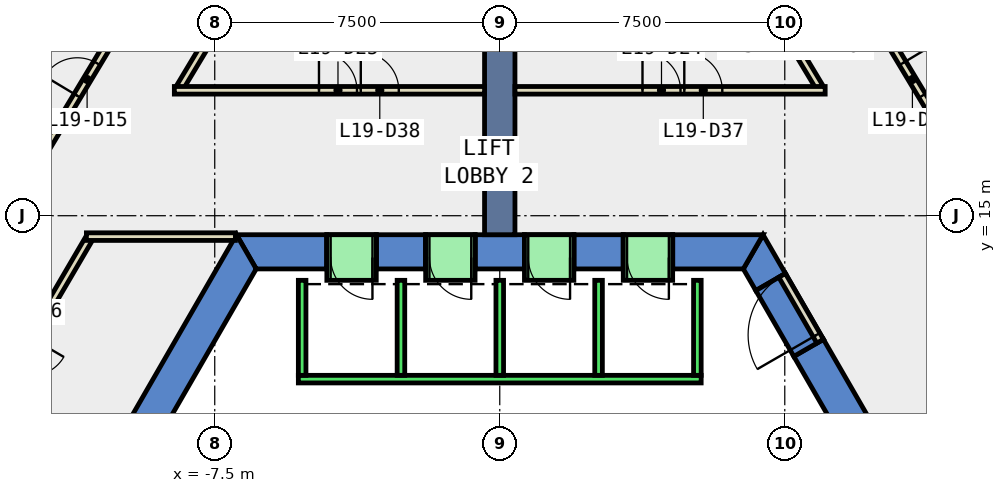
"""IFC4 building model, lengths in metres.
Left out: names, types, materials, properties, quantities, classifications, styles, units other than length and angle.
Written with IfcOpenShell. Run it as: python <this file> out.ifc"""

import sys

from ifc_helpers import new_model, si_unit, direction, frame, frame_2d, origin, place, context, subcontext, project, spatial, polyline, rectangle, outline, extrude, element, fill, save


model = new_model("IFC4")
c1 = context("Model", 3, precision=1e-05, world=origin(), true_north=direction((0.0, 1.0)))
c2 = subcontext(c1, "Body", "Model", "MODEL_VIEW")
j1 = project(units=[si_unit("LENGTHUNIT", "METRE"), si_unit("PLANEANGLEUNIT", "RADIAN")], contexts=[c1])
p1 = place(None, origin())
s1 = spatial("IfcSite", under=j1, at=p1, CompositionType="ELEMENT")
p2 = place(p1, origin())
s2 = spatial("IfcBuilding", under=s1, at=p2, CompositionType="ELEMENT")
p3 = place(p2, frame((0.0, 0.0, 90.8)))
s3 = spatial("IfcBuildingStorey", under=s2, at=p3, CompositionType="ELEMENT", Elevation=90.8)
p4 = place(p3, frame((0.0, 0.0, -0.4)))
e1 = element("IfcWall", 1, at=p4, inside=s3, PredefinedType="SHEAR", context=c2, shape_type="SweptSolid", body=[
    extrude(outline(polyline([(8.517, 11.748), (7.738, 11.298), (12.817, 2.5), (13.856, 2.5), (8.517, 11.748)])), origin(), (0.0, 0.0, 1.0), 4.2),
])
p5 = place(p3, frame((0.0, 0.0, -0.4)))
e2 = element("IfcWall", 2, at=p5, inside=s3, PredefinedType="SHEAR", context=c2, shape_type="SweptSolid", body=[
    extrude(outline(polyline([(6.738, 13.03), (7.517, 13.48), (6.928, 14.5), (6.409, 13.6), (6.738, 13.03)])), origin(), (0.0, 0.0, 1.0), 4.2),
])
p6 = place(p3, frame((0.0, 0.0, 3.6)))
e3 = element("IfcWall", 3, at=p6, inside=s3, PredefinedType="SHEAR", context=c2, shape_type="SweptSolid", body=[
    extrude(outline(polyline([(7.517, 13.48), (6.738, 13.03), (7.738, 11.298), (8.517, 11.748), (7.517, 13.48)])), origin(), (0.0, 0.0, 1.0), 0.2),
])
p7 = place(p3, frame((0.0, 0.0, -0.4)))
e4 = element("IfcWall", 4, at=p7, inside=s3, PredefinedType="SHEAR", context=c2, shape_type="SweptSolid", body=[
    extrude(outline(polyline([(4.55, 14.5), (4.55, 13.6), (6.409, 13.6), (6.928, 14.5), (4.55, 14.5)])), origin(), (0.0, 0.0, 1.0), 4.2),
])
p8 = place(p3, frame((0.0, 0.0, -0.4)))
e5 = element("IfcWall", 5, at=p8, inside=s3, PredefinedType="SHEAR", context=c2, shape_type="SweptSolid", body=[
    extrude(outline(polyline([(1.95, 14.5), (1.95, 13.6), (3.25, 13.6), (3.25, 14.5), (1.95, 14.5)])), origin(), (0.0, 0.0, 1.0), 4.2),
])
p9 = place(p3, frame((0.0, 0.0, -0.4)))
e6 = element("IfcWall", 6, at=p9, inside=s3, PredefinedType="SHEAR", context=c2, shape_type="SweptSolid", body=[
    extrude(outline(polyline([(-0.65, 14.5), (-0.65, 13.6), (0.65, 13.6), (0.65, 14.5), (-0.65, 14.5)])), origin(), (0.0, 0.0, 1.0), 4.2),
])
p10 = place(p3, frame((0.0, 0.0, -0.4)))
e7 = element("IfcWall", 7, at=p10, inside=s3, PredefinedType="SHEAR", context=c2, shape_type="SweptSolid", body=[
    extrude(outline(polyline([(-3.25, 14.5), (-3.25, 13.6), (-1.95, 13.6), (-1.95, 14.5), (-3.25, 14.5)])), origin(), (0.0, 0.0, 1.0), 4.2),
])
p11 = place(p3, frame((0.0, 0.0, -0.4)))
e8 = element("IfcWall", 8, at=p11, inside=s3, PredefinedType="SHEAR", context=c2, shape_type="SweptSolid", body=[
    extrude(outline(polyline([(-4.55, 13.6), (-4.55, 14.5), (-6.928, 14.5), (-6.409, 13.6), (-4.55, 13.6)])), origin(), (0.0, 0.0, 1.0), 4.2),
])
p12 = place(p3, frame((0.0, 0.0, 3.6)))
e9 = element("IfcWall", 9, at=p12, inside=s3, PredefinedType="SHEAR", context=c2, shape_type="SweptSolid", body=[
    extrude(outline(polyline([(3.25, 14.5), (3.25, 13.6), (4.55, 13.6), (4.55, 14.5), (3.25, 14.5)])), origin(), (0.0, 0.0, 1.0), 0.2),
])
p13 = place(p3, frame((0.0, 0.0, 3.6)))
e10 = element("IfcWall", 10, at=p13, inside=s3, PredefinedType="SHEAR", context=c2, shape_type="SweptSolid", body=[
    extrude(outline(polyline([(0.65, 14.5), (0.65, 13.6), (1.95, 13.6), (1.95, 14.5), (0.65, 14.5)])), origin(), (0.0, 0.0, 1.0), 0.2),
])
p14 = place(p3, frame((0.0, 0.0, 3.6)))
e11 = element("IfcWall", 11, at=p14, inside=s3, PredefinedType="SHEAR", context=c2, shape_type="SweptSolid", body=[
    extrude(outline(polyline([(-1.95, 14.5), (-1.95, 13.6), (-0.65, 13.6), (-0.65, 14.5), (-1.95, 14.5)])), origin(), (0.0, 0.0, 1.0), 0.2),
])
p15 = place(p3, frame((0.0, 0.0, 3.6)))
e12 = element("IfcWall", 12, at=p15, inside=s3, PredefinedType="SHEAR", context=c2, shape_type="SweptSolid", body=[
    extrude(outline(polyline([(-4.55, 14.5), (-4.55, 13.6), (-3.25, 13.6), (-3.25, 14.5), (-4.55, 14.5)])), origin(), (0.0, 0.0, 1.0), 0.2),
])
p16 = place(p3, frame((0.0, 0.0, -0.4)))
e13 = element("IfcWall", 13, at=p16, inside=s3, PredefinedType="SHEAR", context=c2, shape_type="SweptSolid", body=[
    extrude(outline(polyline([(-12.267, 5.252), (-11.488, 4.802), (-6.409, 13.6), (-6.928, 14.5), (-12.267, 5.252)])), origin(), (0.0, 0.0, 1.0), 4.2),
])
p17 = place(p3, frame((0.0, 14.5, -0.4), z_axis=(0.0, 0.0, 1.0), x_axis=(0.0, 1.0, 0.0)))
e14 = element("IfcWall", 14, at=p17, inside=s3, PredefinedType="SHEAR", context=c2, shape_type="SweptSolid", body=[
    extrude(rectangle(XDim=9.0, YDim=0.8, at=frame_2d((4.5, 0.0))), origin(), (0.0, 0.0, 1.0), 4.2),
])
for number, where, z_axis, x_axis in (
    (15, (8.411, 18.386, 0.0), (0.0, 0.0, 1.0), (-0.515, 0.857, 0.0)),
    (16, (-7.148, 20.488, 0.0), (0.0, 0.0, 1.0), (-0.515, -0.857, 0.0)),
):
    element("IfcWall", number, at=place(p3, frame(where, z_axis=z_axis, x_axis=x_axis)), inside=s3, PredefinedType="PARTITIONING", context=c2, shape_type="SweptSolid", body=[
        extrude(rectangle(XDim=2.452, YDim=0.2, at=frame_2d((1.226, 0.0))), origin(), (0.0, 0.0, 1.0), 3.8),
    ])
p18 = place(p3, frame((-10.797, 14.415, 0.0), z_axis=(0.0, 0.0, 1.0), x_axis=(-0.505008297342, -0.863114488128, 0.0)))
e17 = element("IfcWall", 17, at=p18, inside=s3, PredefinedType="PARTITIONING", context=c2, shape_type="SweptSolid", body=[
    extrude(rectangle(XDim=7.085, YDim=0.2, at=frame_2d((3.542, 0.0))), origin(), (0.0, 0.0, 1.0), 3.8),
])
p19 = place(p18, frame((3.043, 0.0, 0.0)))
e18 = element("IfcOpeningElement", 18, at=p19, cuts=e17, PredefinedType="OPENING", context=c2, shape_type="SweptSolid", body=[
    extrude(rectangle(XDim=1.0, YDim=2.1, at=frame_2d((0.5, 1.05))), frame((0.0, 0.11, 0.0), z_axis=(0.0, -1.0, 0.0), x_axis=(1.0, 0.0, 0.0)), (0.0, 0.0, 1.0), 0.22),
])
p20 = place(p3, frame((8.989, 21.696, 0.0), z_axis=(0.0, 0.0, 1.0), x_axis=(0.515000602442, -0.857189815318, 0.0)))
e19 = element("IfcWall", 19, at=p20, inside=s3, PredefinedType="PARTITIONING", context=c2, shape_type="SweptSolid", body=[
    extrude(rectangle(XDim=7.11, YDim=0.2, at=frame_2d((3.555, 0.0))), origin(), (0.0, 0.0, 1.0), 3.8),
])
p21 = place(p20, frame((3.13, 0.0, 0.0)))
e20 = element("IfcOpeningElement", 20, at=p21, cuts=e19, PredefinedType="OPENING", context=c2, shape_type="SweptSolid", body=[
    extrude(rectangle(XDim=1.0, YDim=2.1, at=frame_2d((0.5, 1.05))), frame((0.0, 0.11, 0.0), z_axis=(0.0, -1.0, 0.0), x_axis=(1.0, 0.0, 0.0)), (0.0, 0.0, 1.0), 0.22),
])
p22 = place(p3, frame((-12.728, 15.473, 0.0), z_axis=(0.0, 0.0, 1.0), x_axis=(0.515010673306, 0.857183764651, 0.0)))
e21 = element("IfcWall", 21, at=p22, inside=s3, PredefinedType="PARTITIONING", context=c2, shape_type="SweptSolid", body=[
    extrude(rectangle(XDim=7.111, YDim=0.2, at=frame_2d((3.555, 0.0))), origin(), (0.0, 0.0, 1.0), 3.8),
])
p23 = place(p22, frame((3.13, 0.0, 0.0)))
e22 = element("IfcOpeningElement", 22, at=p23, cuts=e21, PredefinedType="OPENING", context=c2, shape_type="SweptSolid", body=[
    extrude(rectangle(XDim=1.0, YDim=2.1, at=frame_2d((0.5, 1.05))), frame((0.0, 0.11, 0.0), z_axis=(0.0, -1.0, 0.0), x_axis=(1.0, 0.0, 0.0)), (0.0, 0.0, 1.0), 0.22),
])
p24 = place(p3, frame((0.4, 18.3, 0.0), z_axis=(0.0, 0.0, 1.0), x_axis=(1.0, 0.0, 0.0)))
e23 = element("IfcWall", 23, at=p24, inside=s3, PredefinedType="PARTITIONING", context=c2, shape_type="SweptSolid", body=[
    extrude(rectangle(XDim=8.163, YDim=0.2, at=frame_2d((4.082, 0.0))), origin(), (0.0, 0.0, 1.0), 3.8),
])
p25 = place(p24, frame((3.356, 0.0, 0.0)))
e24 = element("IfcOpeningElement", 24, at=p25, cuts=e23, PredefinedType="OPENING", context=c2, shape_type="SweptSolid", body=[
    extrude(rectangle(XDim=1.0, YDim=2.1, at=frame_2d((0.5, 1.05))), frame((0.0, 0.11, 0.0), z_axis=(0.0, -1.0, 0.0), x_axis=(1.0, 0.0, 0.0)), (0.0, 0.0, 1.0), 0.22),
])
p26 = place(p24, frame((4.456, 0.0, 0.0)))
e25 = element("IfcOpeningElement", 25, at=p26, cuts=e23, PredefinedType="OPENING", context=c2, shape_type="SweptSolid", body=[
    extrude(rectangle(XDim=1.0, YDim=2.1, at=frame_2d((0.5, 1.05))), frame((0.0, 0.11, 0.0), z_axis=(0.0, -1.0, 0.0), x_axis=(1.0, 0.0, 0.0)), (0.0, 0.0, 1.0), 0.22),
])
p27 = place(p3, frame((-8.563, 18.3, 0.0), z_axis=(0.0, 0.0, 1.0), x_axis=(1.0, 0.0, 0.0)))
e26 = element("IfcWall", 26, at=p27, inside=s3, PredefinedType="PARTITIONING", context=c2, shape_type="SweptSolid", body=[
    extrude(rectangle(XDim=8.163, YDim=0.2, at=frame_2d((4.082, 0.0))), origin(), (0.0, 0.0, 1.0), 3.8),
])
p28 = place(p27, frame((3.806, 0.0, 0.0)))
e27 = element("IfcOpeningElement", 27, at=p28, cuts=e26, PredefinedType="OPENING", context=c2, shape_type="SweptSolid", body=[
    extrude(rectangle(XDim=1.0, YDim=2.1, at=frame_2d((0.5, 1.05))), frame((0.0, 0.11, 0.0), z_axis=(0.0, -1.0, 0.0), x_axis=(1.0, 0.0, 0.0)), (0.0, 0.0, 1.0), 0.22),
])
p29 = place(p27, frame((4.906, 0.0, 0.0)))
e28 = element("IfcOpeningElement", 28, at=p29, cuts=e26, PredefinedType="OPENING", context=c2, shape_type="SweptSolid", body=[
    extrude(rectangle(XDim=1.0, YDim=2.1, at=frame_2d((0.5, 1.05))), frame((0.0, 0.11, 0.0), z_axis=(0.0, -1.0, 0.0), x_axis=(1.0, 0.0, 0.0)), (0.0, 0.0, 1.0), 0.22),
])
p30 = place(p3, frame((-6.957, 14.45, 0.0), z_axis=(0.0, 0.0, 1.0), x_axis=(-1.0, 0.0, 0.0)))
e29 = element("IfcWall", 29, at=p30, inside=s3, PredefinedType="PARTITIONING", context=c2, shape_type="SweptSolid", body=[
    extrude(rectangle(XDim=3.92, YDim=0.2, at=frame_2d((1.96, 0.0))), origin(), (0.0, 0.0, 1.0), 3.8),
])
p31 = place(p3, frame((8.43, 11.698, 0.0), z_axis=(0.0, 0.0, 1.0), x_axis=(-0.50002537861, 0.866010750942, 0.0)))
e30 = element("IfcWall", 30, at=p31, inside=s3, PredefinedType="PARTITIONING", context=c2, shape_type="SweptSolid", body=[
    extrude(rectangle(XDim=2.0, YDim=0.2, at=frame_2d((1.0, 0.0))), origin(), (0.0, 0.0, 1.0), 2.4),
])
p32 = place(p31, frame((0.19, 0.0, 0.0)))
e31 = element("IfcOpeningElement", 31, at=p32, cuts=e30, PredefinedType="OPENING", context=c2, shape_type="SweptSolid", body=[
    extrude(rectangle(XDim=1.8, YDim=2.1, at=frame_2d((0.9, 1.05))), frame((0.0, 0.11, 0.0), z_axis=(0.0, -1.0, 0.0), x_axis=(1.0, 0.0, 0.0)), (0.0, 0.0, 1.0), 0.22),
])
p33 = place(p3, frame((5.3, 10.7, 0.0), z_axis=(0.0, 0.0, 1.0), x_axis=(-1.0, 0.0, 0.0)))
e32 = element("IfcWall", 32, at=p33, inside=s3, PredefinedType="STANDARD", context=c2, shape_type="SweptSolid", body=[
    extrude(rectangle(XDim=10.6, YDim=0.2, at=frame_2d((5.3, 0.0))), origin(), (0.0, 0.0, 1.0), 3.8),
])
for number, where, z_axis, x_axis in (
    (33, (5.2, 10.8, 0.0), (0.0, 0.0, 1.0), (0.0, 1.0, 0.0)),
    (34, (2.6, 10.8, 0.0), (0.0, 0.0, 1.0), (0.0, 1.0, 0.0)),
    (35, (0.0, 10.8, 0.0), (0.0, 0.0, 1.0), (0.0, 1.0, 0.0)),
    (36, (-2.6, 10.8, 0.0), (0.0, 0.0, 1.0), (0.0, 1.0, 0.0)),
    (37, (-5.2, 10.8, 0.0), (0.0, 0.0, 1.0), (0.0, 1.0, 0.0)),
):
    element("IfcWall", number, at=place(p3, frame(where, z_axis=z_axis, x_axis=x_axis)), inside=s3, PredefinedType="STANDARD", context=c2, shape_type="SweptSolid", body=[
        extrude(rectangle(XDim=2.5, YDim=0.2, at=frame_2d((1.25, 0.0))), origin(), (0.0, 0.0, 1.0), 3.8),
    ])
p34 = place(p3, frame((4.55, 13.9, 0.0), z_axis=(0.0, 0.0, 1.0), x_axis=(-1.0, 0.0, 0.0)))
e38 = element("IfcWall", 38, at=p34, inside=s3, PredefinedType="STANDARD", context=c2, shape_type="SweptSolid", body=[
    extrude(rectangle(XDim=1.3, YDim=1.2, at=frame_2d((0.65, 0.0))), origin(), (0.0, 0.0, 1.0), 2.4),
])
p35 = place(p34, frame((0.1, 0.0, 0.0)))
e39 = element("IfcOpeningElement", 39, at=p35, cuts=e38, PredefinedType="OPENING", context=c2, shape_type="SweptSolid", body=[
    extrude(rectangle(XDim=1.1, YDim=2.3, at=frame_2d((0.55, 1.15))), frame((0.0, 0.61, 0.0), z_axis=(0.0, -1.0, 0.0), x_axis=(1.0, 0.0, 0.0)), (0.0, 0.0, 1.0), 1.22),
])
p36 = place(p3, frame((1.95, 13.9, 0.0), z_axis=(0.0, 0.0, 1.0), x_axis=(-1.0, 0.0, 0.0)))
e40 = element("IfcWall", 40, at=p36, inside=s3, PredefinedType="STANDARD", context=c2, shape_type="SweptSolid", body=[
    extrude(rectangle(XDim=1.3, YDim=1.2, at=frame_2d((0.65, 0.0))), origin(), (0.0, 0.0, 1.0), 2.4),
])
p37 = place(p36, frame((0.1, 0.0, 0.0)))
e41 = element("IfcOpeningElement", 41, at=p37, cuts=e40, PredefinedType="OPENING", context=c2, shape_type="SweptSolid", body=[
    extrude(rectangle(XDim=1.1, YDim=2.3, at=frame_2d((0.55, 1.15))), frame((0.0, 0.61, 0.0), z_axis=(0.0, -1.0, 0.0), x_axis=(1.0, 0.0, 0.0)), (0.0, 0.0, 1.0), 1.22),
])
p38 = place(p3, frame((-0.65, 13.9, 0.0), z_axis=(0.0, 0.0, 1.0), x_axis=(-1.0, 0.0, 0.0)))
e42 = element("IfcWall", 42, at=p38, inside=s3, PredefinedType="STANDARD", context=c2, shape_type="SweptSolid", body=[
    extrude(rectangle(XDim=1.3, YDim=1.2, at=frame_2d((0.65, 0.0))), origin(), (0.0, 0.0, 1.0), 2.4),
])
p39 = place(p38, frame((0.1, 0.0, 0.0)))
e43 = element("IfcOpeningElement", 43, at=p39, cuts=e42, PredefinedType="OPENING", context=c2, shape_type="SweptSolid", body=[
    extrude(rectangle(XDim=1.1, YDim=2.3, at=frame_2d((0.55, 1.15))), frame((0.0, 0.61, 0.0), z_axis=(0.0, -1.0, 0.0), x_axis=(1.0, 0.0, 0.0)), (0.0, 0.0, 1.0), 1.22),
])
p40 = place(p3, frame((-3.25, 13.9, 0.0), z_axis=(0.0, 0.0, 1.0), x_axis=(-1.0, 0.0, 0.0)))
e44 = element("IfcWall", 44, at=p40, inside=s3, PredefinedType="STANDARD", context=c2, shape_type="SweptSolid", body=[
    extrude(rectangle(XDim=1.3, YDim=1.2, at=frame_2d((0.65, 0.0))), origin(), (0.0, 0.0, 1.0), 2.4),
])
p41 = place(p40, frame((0.1, 0.0, 0.0)))
e45 = element("IfcOpeningElement", 45, at=p41, cuts=e44, PredefinedType="OPENING", context=c2, shape_type="SweptSolid", body=[
    extrude(rectangle(XDim=1.1, YDim=2.3, at=frame_2d((0.55, 1.15))), frame((0.0, 0.61, 0.0), z_axis=(0.0, -1.0, 0.0), x_axis=(1.0, 0.0, 0.0)), (0.0, 0.0, 1.0), 1.22),
])
p42 = place(p21, origin())
e46 = element("IfcDoor", 46, at=p42, inside=s3, OperationType="SINGLE_SWING_LEFT", PredefinedType="DOOR", context=c2, shape_type="SweptSolid", body=[
    extrude(rectangle(XDim=1.0, YDim=2.1, at=frame_2d((0.5, 1.05))), frame((0.0, 0.025, 0.0), z_axis=(0.0, -1.0, 0.0), x_axis=(1.0, 0.0, 0.0)), (0.0, 0.0, 1.0), 0.05),
])
fill(e20, e46)
p43 = place(p23, origin())
e47 = element("IfcDoor", 47, at=p43, inside=s3, OperationType="SINGLE_SWING_LEFT", PredefinedType="DOOR", context=c2, shape_type="SweptSolid", body=[
    extrude(rectangle(XDim=1.0, YDim=2.1, at=frame_2d((0.5, 1.05))), frame((0.0, 0.025, 0.0), z_axis=(0.0, -1.0, 0.0), x_axis=(1.0, 0.0, 0.0)), (0.0, 0.0, 1.0), 0.05),
])
fill(e22, e47)
p44 = place(p25, origin())
e48 = element("IfcDoor", 48, at=p44, inside=s3, OperationType="SINGLE_SWING_RIGHT", PredefinedType="DOOR", context=c2, shape_type="SweptSolid", body=[
    extrude(rectangle(XDim=1.0, YDim=2.1, at=frame_2d((0.5, 1.05))), frame((0.0, 0.025, 0.0), z_axis=(0.0, -1.0, 0.0), x_axis=(1.0, 0.0, 0.0)), (0.0, 0.0, 1.0), 0.05),
])
fill(e24, e48)
p45 = place(p28, origin())
e49 = element("IfcDoor", 49, at=p45, inside=s3, OperationType="SINGLE_SWING_RIGHT", PredefinedType="DOOR", context=c2, shape_type="SweptSolid", body=[
    extrude(rectangle(XDim=1.0, YDim=2.1, at=frame_2d((0.5, 1.05))), frame((0.0, 0.025, 0.0), z_axis=(0.0, -1.0, 0.0), x_axis=(1.0, 0.0, 0.0)), (0.0, 0.0, 1.0), 0.05),
])
fill(e27, e49)
p46 = place(p26, origin())
e50 = element("IfcDoor", 50, at=p46, inside=s3, OperationType="SINGLE_SWING_RIGHT", PredefinedType="DOOR", context=c2, shape_type="SweptSolid", body=[
    extrude(rectangle(XDim=1.0, YDim=2.1, at=frame_2d((0.5, 1.05))), frame((0.0, 0.025, 0.0), z_axis=(0.0, -1.0, 0.0), x_axis=(1.0, 0.0, 0.0)), (0.0, 0.0, 1.0), 0.05),
])
fill(e25, e50)
p47 = place(p29, origin())
e51 = element("IfcDoor", 51, at=p47, inside=s3, OperationType="SINGLE_SWING_RIGHT", PredefinedType="DOOR", context=c2, shape_type="SweptSolid", body=[
    extrude(rectangle(XDim=1.0, YDim=2.1, at=frame_2d((0.5, 1.05))), frame((0.0, 0.025, 0.0), z_axis=(0.0, -1.0, 0.0), x_axis=(1.0, 0.0, 0.0)), (0.0, 0.0, 1.0), 0.05),
])
fill(e28, e51)
p48 = place(p32, origin())
e52 = element("IfcDoor", 52, at=p48, inside=s3, OperationType="DOUBLE_DOOR_SINGLE_SWING", PredefinedType="DOOR", context=c2, shape_type="SweptSolid", body=[
    extrude(rectangle(XDim=1.8, YDim=2.1, at=frame_2d((0.9, 1.05))), frame((0.0, 0.025, 0.0), z_axis=(0.0, -1.0, 0.0), x_axis=(1.0, 0.0, 0.0)), (0.0, 0.0, 1.0), 0.05),
])
fill(e31, e52)
p49 = place(p35, origin())
e53 = element("IfcDoor", 53, at=p49, inside=s3, OperationType="SLIDING_TO_LEFT", PredefinedType="DOOR", context=c2, shape_type="SweptSolid", body=[
    extrude(rectangle(XDim=1.1, YDim=2.3, at=frame_2d((0.55, 1.15))), frame((0.0, 0.025, 0.0), z_axis=(0.0, -1.0, 0.0), x_axis=(1.0, 0.0, 0.0)), (0.0, 0.0, 1.0), 0.05),
])
fill(e39, e53)
p50 = place(p37, origin())
e54 = element("IfcDoor", 54, at=p50, inside=s3, OperationType="SLIDING_TO_LEFT", PredefinedType="DOOR", context=c2, shape_type="SweptSolid", body=[
    extrude(rectangle(XDim=1.1, YDim=2.3, at=frame_2d((0.55, 1.15))), frame((0.0, 0.025, 0.0), z_axis=(0.0, -1.0, 0.0), x_axis=(1.0, 0.0, 0.0)), (0.0, 0.0, 1.0), 0.05),
])
fill(e41, e54)
p51 = place(p39, origin())
e55 = element("IfcDoor", 55, at=p51, inside=s3, OperationType="SLIDING_TO_LEFT", PredefinedType="DOOR", context=c2, shape_type="SweptSolid", body=[
    extrude(rectangle(XDim=1.1, YDim=2.3, at=frame_2d((0.55, 1.15))), frame((0.0, 0.025, 0.0), z_axis=(0.0, -1.0, 0.0), x_axis=(1.0, 0.0, 0.0)), (0.0, 0.0, 1.0), 0.05),
])
fill(e43, e55)
p52 = place(p41, origin())
e56 = element("IfcDoor", 56, at=p52, inside=s3, OperationType="SLIDING_TO_LEFT", PredefinedType="DOOR", context=c2, shape_type="SweptSolid", body=[
    extrude(rectangle(XDim=1.1, YDim=2.3, at=frame_2d((0.55, 1.15))), frame((0.0, 0.025, 0.0), z_axis=(0.0, -1.0, 0.0), x_axis=(1.0, 0.0, 0.0)), (0.0, 0.0, 1.0), 0.05),
])
fill(e45, e56)
save(model, sys.argv[1])
